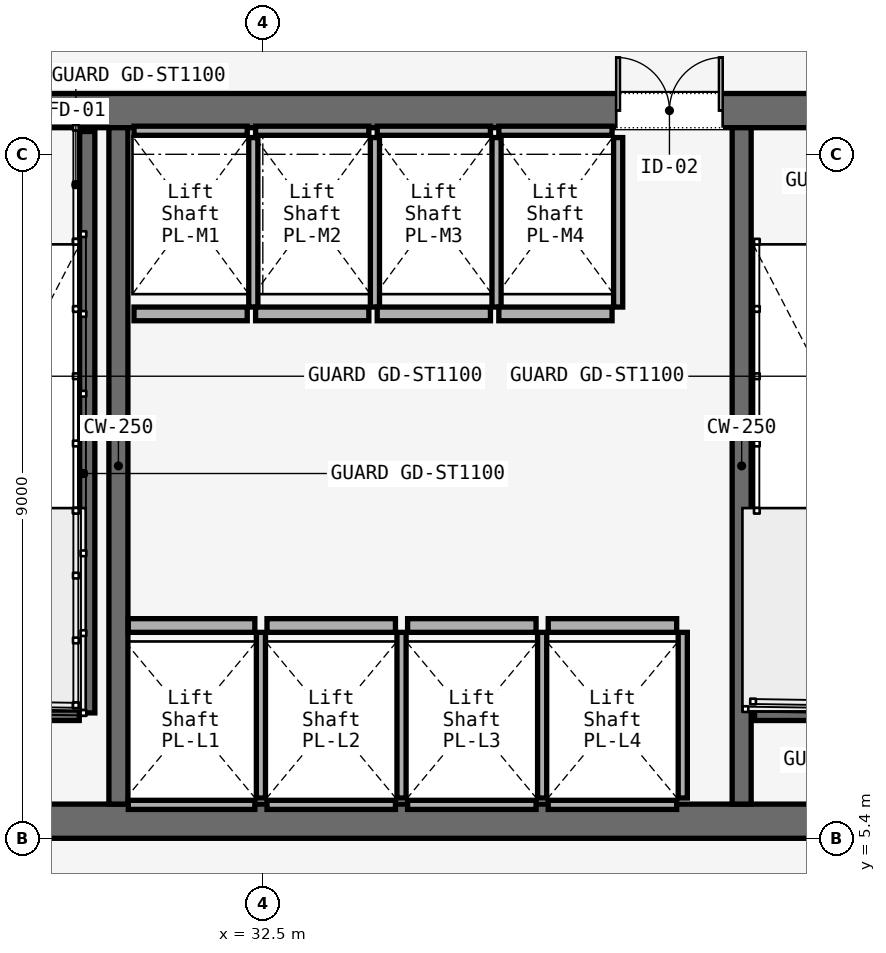
"""IFC4 building model, lengths in metres.
Left out: names, types, materials, properties, quantities, classifications, styles, units other than length and angle.
Written with IfcOpenShell. Run it as: python <this file> out.ifc"""

import sys

from ifc_helpers import new_model, si_unit, direction, frame, frame_2d, origin, place, context, subcontext, project, spatial, rectangle, extrude, element, fill, save


model = new_model("IFC4")
c1 = context("Model", 3, precision=1e-05, world=origin(), true_north=direction((0.0, 1.0)))
c2 = subcontext(c1, "Body", "Model", "MODEL_VIEW")
j1 = project(units=[si_unit("LENGTHUNIT", "METRE"), si_unit("PLANEANGLEUNIT", "RADIAN")], contexts=[c1])
p1 = place(None, origin())
s1 = spatial("IfcSite", under=j1, at=p1, CompositionType="ELEMENT")
p2 = place(p1, origin())
s2 = spatial("IfcBuilding", under=s1, at=p2, CompositionType="ELEMENT")
p3 = place(p2, frame((0.0, 0.0, 122.2)))
s3 = spatial("IfcBuildingStorey", under=s2, at=p3, CompositionType="ELEMENT", Elevation=122.2)
p4 = place(p3, frame((26.45, 14.975, 0.0), z_axis=(0.0, 0.0, 1.0), x_axis=(1.0, 0.0, 0.0)))
e1 = element("IfcWall", 1, at=p4, inside=s3, PredefinedType="SOLIDWALL", context=c2, shape_type="SweptSolid", body=[
    extrude(rectangle(XDim=31.1, YDim=0.45, at=frame_2d((15.55, 0.0))), origin(), (0.0, 0.0, 1.0), 4.58),
])
p5 = place(p4, frame((1.65, 0.0, 0.0)))
e2 = element("IfcOpeningElement", 2, at=p5, cuts=e1, PredefinedType="OPENING", context=c2, shape_type="SweptSolid", body=[
    extrude(rectangle(XDim=1.1, YDim=2.2, at=frame_2d((0.55, 1.1))), frame((0.0, 0.225, 0.0), z_axis=(0.0, -1.0, 0.0), x_axis=(1.0, 0.0, 0.0)), (0.0, 0.0, 1.0), 0.45),
])
p6 = place(p4, frame((13.65, 0.0, 0.0)))
e3 = element("IfcOpeningElement", 3, at=p6, cuts=e1, PredefinedType="OPENING", context=c2, shape_type="SweptSolid", body=[
    extrude(rectangle(XDim=1.1, YDim=2.2, at=frame_2d((0.55, 1.1))), frame((0.0, 0.225, 0.0), z_axis=(0.0, -1.0, 0.0), x_axis=(1.0, 0.0, 0.0)), (0.0, 0.0, 1.0), 0.45),
])
p7 = place(p4, frame((25.55, 0.0, 0.0)))
e4 = element("IfcOpeningElement", 4, at=p7, cuts=e1, PredefinedType="OPENING", context=c2, shape_type="SweptSolid", body=[
    extrude(rectangle(XDim=1.1, YDim=2.2, at=frame_2d((0.55, 1.1))), frame((0.0, 0.225, 0.0), z_axis=(0.0, -1.0, 0.0), x_axis=(1.0, 0.0, 0.0)), (0.0, 0.0, 1.0), 0.45),
])
p8 = place(p4, frame((10.7, 0.0, 0.0)))
e5 = element("IfcOpeningElement", 5, at=p8, cuts=e1, PredefinedType="OPENING", context=c2, shape_type="SweptSolid", body=[
    extrude(rectangle(XDim=1.4, YDim=2.2, at=frame_2d((0.7, 1.1))), frame((0.0, 0.225, 0.0), z_axis=(0.0, -1.0, 0.0), x_axis=(1.0, 0.0, 0.0)), (0.0, 0.0, 1.0), 0.45),
])
p9 = place(p4, frame((19.35, 0.0, 0.0)))
e6 = element("IfcOpeningElement", 6, at=p9, cuts=e1, PredefinedType="OPENING", context=c2, shape_type="SweptSolid", body=[
    extrude(rectangle(XDim=1.1, YDim=2.2, at=frame_2d((0.55, 1.1))), frame((0.0, 0.225, 0.0), z_axis=(0.0, -1.0, 0.0), x_axis=(1.0, 0.0, 0.0)), (0.0, 0.0, 1.0), 0.45),
])
p10 = place(p4, frame((21.4, 0.0, 0.0)))
e7 = element("IfcOpeningElement", 7, at=p10, cuts=e1, PredefinedType="OPENING", context=c2, shape_type="SweptSolid", body=[
    extrude(rectangle(XDim=0.9, YDim=2.1, at=frame_2d((0.45, 1.05))), frame((0.0, 0.225, 0.0), z_axis=(0.0, -1.0, 0.0), x_axis=(1.0, 0.0, 0.0)), (0.0, 0.0, 1.0), 0.45),
])
p11 = place(p4, frame((23.35, 0.0, 0.0)))
e8 = element("IfcOpeningElement", 8, at=p11, cuts=e1, PredefinedType="OPENING", context=c2, shape_type="SweptSolid", body=[
    extrude(rectangle(XDim=1.3, YDim=2.3, at=frame_2d((0.65, 1.15))), frame((0.0, 0.225, 0.0), z_axis=(0.0, -1.0, 0.0), x_axis=(1.0, 0.0, 0.0)), (0.0, 0.0, 1.0), 0.45),
])
p12 = place(p3, frame((26.45, 5.625, 0.0), z_axis=(0.0, 0.0, 1.0), x_axis=(1.0, 0.0, 0.0)))
e9 = element("IfcWall", 9, at=p12, inside=s3, PredefinedType="SOLIDWALL", context=c2, shape_type="SweptSolid", body=[
    extrude(rectangle(XDim=31.1, YDim=0.45, at=frame_2d((15.55, 0.0))), origin(), (0.0, 0.0, 1.0), 4.58),
])
for number, where, z_axis, x_axis in (
    (10, (30.6, 5.85, 0.0), (0.0, 0.0, 1.0), (0.0, 1.0, 0.0)),
    (11, (38.8, 5.85, 0.0), (0.0, 0.0, 1.0), (0.0, 1.0, 0.0)),
):
    element("IfcWall", number, at=place(p3, frame(where, z_axis=z_axis, x_axis=x_axis)), inside=s3, PredefinedType="SOLIDWALL", context=c2, shape_type="SweptSolid", body=[
        extrude(rectangle(XDim=8.9, YDim=0.25, at=frame_2d((4.45, 0.0))), origin(), (0.0, 0.0, 1.0), 4.58),
    ])
p13 = place(p3, frame((30.19, 14.7, 0.0), z_axis=(0.0, 0.0, 1.0), x_axis=(0.0, -1.0, 0.0)))
e12 = element("IfcWall", 12, at=p13, inside=s3, PredefinedType="SOLIDWALL", context=c2, shape_type="SweptSolid", body=[
    extrude(rectangle(XDim=7.65, YDim=0.2, at=frame_2d((3.825, 0.0))), origin(), (0.0, 0.0, 1.0), 4.8),
])
for number, where, z_axis, x_axis in (
    (13, (26.97, 7.05, 0.0), (0.0, 0.0, 1.0), (1.0, 0.0, 0.0)),
    (14, (38.97, 7.05, 0.0), (0.0, 0.0, 1.0), (1.0, 0.0, 0.0)),
):
    element("IfcWall", number, at=place(p3, frame(where, z_axis=z_axis, x_axis=x_axis)), inside=s3, PredefinedType="SOLIDWALL", context=c2, shape_type="SweptSolid", body=[
        extrude(rectangle(XDim=3.115, YDim=0.2, at=frame_2d((1.558, 0.0))), origin(), (0.0, 0.0, 1.0), 4.8),
    ])
p14 = place(p3, frame((30.73, 8.2, 0.0), z_axis=(0.0, 0.0, 1.0), x_axis=(1.0, 0.0, 0.0)))
e15 = element("IfcWall", 15, at=p14, inside=s3, PredefinedType="SOLIDWALL", context=c2, shape_type="SweptSolid", body=[
    extrude(rectangle(XDim=1.665, YDim=0.18, at=frame_2d((0.833, 0.0))), origin(), (0.0, 0.0, 1.0), 4.01),
])
p15 = place(p3, frame((30.73, 5.84, 0.0), z_axis=(0.0, 0.0, 1.0), x_axis=(1.0, 0.0, 0.0)))
e16 = element("IfcWall", 16, at=p15, inside=s3, PredefinedType="SOLIDWALL", context=c2, shape_type="SweptSolid", body=[
    extrude(rectangle(XDim=1.665, YDim=0.12, at=frame_2d((0.833, 0.0))), origin(), (0.0, 0.0, 1.0), 4.01),
])
p16 = place(p3, frame((32.475, 5.93, 0.0), z_axis=(0.0, 0.0, 1.0), x_axis=(0.0, 1.0, 0.0)))
e17 = element("IfcWall", 17, at=p16, inside=s3, PredefinedType="SOLIDWALL", context=c2, shape_type="SweptSolid", body=[
    extrude(rectangle(XDim=2.18, YDim=0.12, at=frame_2d((1.09, 0.0))), origin(), (0.0, 0.0, 1.0), 4.01),
])
p17 = place(p3, frame((32.555, 8.2, 0.0), z_axis=(0.0, 0.0, 1.0), x_axis=(1.0, 0.0, 0.0)))
e18 = element("IfcWall", 18, at=p17, inside=s3, PredefinedType="SOLIDWALL", context=c2, shape_type="SweptSolid", body=[
    extrude(rectangle(XDim=1.69, YDim=0.18, at=frame_2d((0.845, 0.0))), origin(), (0.0, 0.0, 1.0), 4.01),
])
p18 = place(p3, frame((32.555, 5.84, 0.0), z_axis=(0.0, 0.0, 1.0), x_axis=(1.0, 0.0, 0.0)))
e19 = element("IfcWall", 19, at=p18, inside=s3, PredefinedType="SOLIDWALL", context=c2, shape_type="SweptSolid", body=[
    extrude(rectangle(XDim=1.69, YDim=0.12, at=frame_2d((0.845, 0.0))), origin(), (0.0, 0.0, 1.0), 4.01),
])
p19 = place(p3, frame((34.325, 5.93, 0.0), z_axis=(0.0, 0.0, 1.0), x_axis=(0.0, 1.0, 0.0)))
e20 = element("IfcWall", 20, at=p19, inside=s3, PredefinedType="SOLIDWALL", context=c2, shape_type="SweptSolid", body=[
    extrude(rectangle(XDim=2.18, YDim=0.12, at=frame_2d((1.09, 0.0))), origin(), (0.0, 0.0, 1.0), 4.01),
])
p20 = place(p3, frame((34.405, 8.2, 0.0), z_axis=(0.0, 0.0, 1.0), x_axis=(1.0, 0.0, 0.0)))
e21 = element("IfcWall", 21, at=p20, inside=s3, PredefinedType="SOLIDWALL", context=c2, shape_type="SweptSolid", body=[
    extrude(rectangle(XDim=1.69, YDim=0.18, at=frame_2d((0.845, 0.0))), origin(), (0.0, 0.0, 1.0), 4.01),
])
p21 = place(p3, frame((34.405, 5.84, 0.0), z_axis=(0.0, 0.0, 1.0), x_axis=(1.0, 0.0, 0.0)))
e22 = element("IfcWall", 22, at=p21, inside=s3, PredefinedType="SOLIDWALL", context=c2, shape_type="SweptSolid", body=[
    extrude(rectangle(XDim=1.69, YDim=0.12, at=frame_2d((0.845, 0.0))), origin(), (0.0, 0.0, 1.0), 4.01),
])
p22 = place(p3, frame((36.175, 5.93, 0.0), z_axis=(0.0, 0.0, 1.0), x_axis=(0.0, 1.0, 0.0)))
e23 = element("IfcWall", 23, at=p22, inside=s3, PredefinedType="SOLIDWALL", context=c2, shape_type="SweptSolid", body=[
    extrude(rectangle(XDim=2.18, YDim=0.12, at=frame_2d((1.09, 0.0))), origin(), (0.0, 0.0, 1.0), 4.01),
])
p23 = place(p3, frame((36.255, 8.2, 0.0), z_axis=(0.0, 0.0, 1.0), x_axis=(1.0, 0.0, 0.0)))
e24 = element("IfcWall", 24, at=p23, inside=s3, PredefinedType="SOLIDWALL", context=c2, shape_type="SweptSolid", body=[
    extrude(rectangle(XDim=1.69, YDim=0.18, at=frame_2d((0.845, 0.0))), origin(), (0.0, 0.0, 1.0), 4.01),
])
p24 = place(p3, frame((36.255, 5.84, 0.0), z_axis=(0.0, 0.0, 1.0), x_axis=(1.0, 0.0, 0.0)))
e25 = element("IfcWall", 25, at=p24, inside=s3, PredefinedType="SOLIDWALL", context=c2, shape_type="SweptSolid", body=[
    extrude(rectangle(XDim=1.69, YDim=0.12, at=frame_2d((0.845, 0.0))), origin(), (0.0, 0.0, 1.0), 4.01),
])
p25 = place(p3, frame((38.025, 5.93, 0.0), z_axis=(0.0, 0.0, 1.0), x_axis=(0.0, 1.0, 0.0)))
e26 = element("IfcWall", 26, at=p25, inside=s3, PredefinedType="SOLIDWALL", context=c2, shape_type="SweptSolid", body=[
    extrude(rectangle(XDim=2.18, YDim=0.12, at=frame_2d((1.09, 0.0))), origin(), (0.0, 0.0, 1.0), 4.01),
])
p26 = place(p3, frame((30.805, 12.3, 0.0), z_axis=(0.0, 0.0, 1.0), x_axis=(1.0, 0.0, 0.0)))
e27 = element("IfcWall", 27, at=p26, inside=s3, PredefinedType="SOLIDWALL", context=c2, shape_type="SweptSolid", body=[
    extrude(rectangle(XDim=1.49, YDim=0.18, at=frame_2d((0.745, 0.0))), origin(), (0.0, 0.0, 1.0), 4.01),
])
p27 = place(p3, frame((30.805, 14.71, 0.0), z_axis=(0.0, 0.0, 1.0), x_axis=(1.0, 0.0, 0.0)))
e28 = element("IfcWall", 28, at=p27, inside=s3, PredefinedType="SOLIDWALL", context=c2, shape_type="SweptSolid", body=[
    extrude(rectangle(XDim=1.49, YDim=0.12, at=frame_2d((0.745, 0.0))), origin(), (0.0, 0.0, 1.0), 4.01),
])
p28 = place(p3, frame((32.375, 12.39, 0.0), z_axis=(0.0, 0.0, 1.0), x_axis=(0.0, 1.0, 0.0)))
e29 = element("IfcWall", 29, at=p28, inside=s3, PredefinedType="SOLIDWALL", context=c2, shape_type="SweptSolid", body=[
    extrude(rectangle(XDim=2.23, YDim=0.12, at=frame_2d((1.115, 0.0))), origin(), (0.0, 0.0, 1.0), 4.01),
])
p29 = place(p3, frame((32.405, 12.3, 0.0), z_axis=(0.0, 0.0, 1.0), x_axis=(1.0, 0.0, 0.0)))
e30 = element("IfcWall", 30, at=p29, inside=s3, PredefinedType="SOLIDWALL", context=c2, shape_type="SweptSolid", body=[
    extrude(rectangle(XDim=1.49, YDim=0.18, at=frame_2d((0.745, 0.0))), origin(), (0.0, 0.0, 1.0), 4.01),
])
p30 = place(p3, frame((32.405, 14.71, 0.0), z_axis=(0.0, 0.0, 1.0), x_axis=(1.0, 0.0, 0.0)))
e31 = element("IfcWall", 31, at=p30, inside=s3, PredefinedType="SOLIDWALL", context=c2, shape_type="SweptSolid", body=[
    extrude(rectangle(XDim=1.49, YDim=0.12, at=frame_2d((0.745, 0.0))), origin(), (0.0, 0.0, 1.0), 4.01),
])
p31 = place(p3, frame((33.975, 12.39, 0.0), z_axis=(0.0, 0.0, 1.0), x_axis=(0.0, 1.0, 0.0)))
e32 = element("IfcWall", 32, at=p31, inside=s3, PredefinedType="SOLIDWALL", context=c2, shape_type="SweptSolid", body=[
    extrude(rectangle(XDim=2.23, YDim=0.12, at=frame_2d((1.115, 0.0))), origin(), (0.0, 0.0, 1.0), 4.01),
])
p32 = place(p3, frame((34.005, 12.3, 0.0), z_axis=(0.0, 0.0, 1.0), x_axis=(1.0, 0.0, 0.0)))
e33 = element("IfcWall", 33, at=p32, inside=s3, PredefinedType="SOLIDWALL", context=c2, shape_type="SweptSolid", body=[
    extrude(rectangle(XDim=1.49, YDim=0.18, at=frame_2d((0.745, 0.0))), origin(), (0.0, 0.0, 1.0), 4.01),
])
p33 = place(p3, frame((34.005, 14.71, 0.0), z_axis=(0.0, 0.0, 1.0), x_axis=(1.0, 0.0, 0.0)))
e34 = element("IfcWall", 34, at=p33, inside=s3, PredefinedType="SOLIDWALL", context=c2, shape_type="SweptSolid", body=[
    extrude(rectangle(XDim=1.49, YDim=0.12, at=frame_2d((0.745, 0.0))), origin(), (0.0, 0.0, 1.0), 4.01),
])
p34 = place(p3, frame((35.575, 12.39, 0.0), z_axis=(0.0, 0.0, 1.0), x_axis=(0.0, 1.0, 0.0)))
e35 = element("IfcWall", 35, at=p34, inside=s3, PredefinedType="SOLIDWALL", context=c2, shape_type="SweptSolid", body=[
    extrude(rectangle(XDim=2.23, YDim=0.12, at=frame_2d((1.115, 0.0))), origin(), (0.0, 0.0, 1.0), 4.01),
])
p35 = place(p3, frame((35.605, 12.3, 0.0), z_axis=(0.0, 0.0, 1.0), x_axis=(1.0, 0.0, 0.0)))
e36 = element("IfcWall", 36, at=p35, inside=s3, PredefinedType="SOLIDWALL", context=c2, shape_type="SweptSolid", body=[
    extrude(rectangle(XDim=1.49, YDim=0.18, at=frame_2d((0.745, 0.0))), origin(), (0.0, 0.0, 1.0), 4.01),
])
p36 = place(p3, frame((35.605, 14.71, 0.0), z_axis=(0.0, 0.0, 1.0), x_axis=(1.0, 0.0, 0.0)))
e37 = element("IfcWall", 37, at=p36, inside=s3, PredefinedType="SOLIDWALL", context=c2, shape_type="SweptSolid", body=[
    extrude(rectangle(XDim=1.49, YDim=0.12, at=frame_2d((0.745, 0.0))), origin(), (0.0, 0.0, 1.0), 4.01),
])
p37 = place(p3, frame((37.175, 12.39, 0.0), z_axis=(0.0, 0.0, 1.0), x_axis=(0.0, 1.0, 0.0)))
e38 = element("IfcWall", 38, at=p37, inside=s3, PredefinedType="SOLIDWALL", context=c2, shape_type="SweptSolid", body=[
    extrude(rectangle(XDim=2.23, YDim=0.12, at=frame_2d((1.115, 0.0))), origin(), (0.0, 0.0, 1.0), 4.01),
])
p38 = place(p8, origin())
e39 = element("IfcDoor", 39, at=p38, inside=s3, OperationType="DOUBLE_DOOR_SINGLE_SWING", PredefinedType="DOOR", context=c2, shape_type="SweptSolid", body=[
    extrude(rectangle(XDim=1.4, YDim=2.2, at=frame_2d((0.7, 1.1))), frame((0.0, 0.025, 0.0), z_axis=(0.0, -1.0, 0.0), x_axis=(1.0, 0.0, 0.0)), (0.0, 0.0, 1.0), 0.05),
])
fill(e5, e39)
save(model, sys.argv[1])
